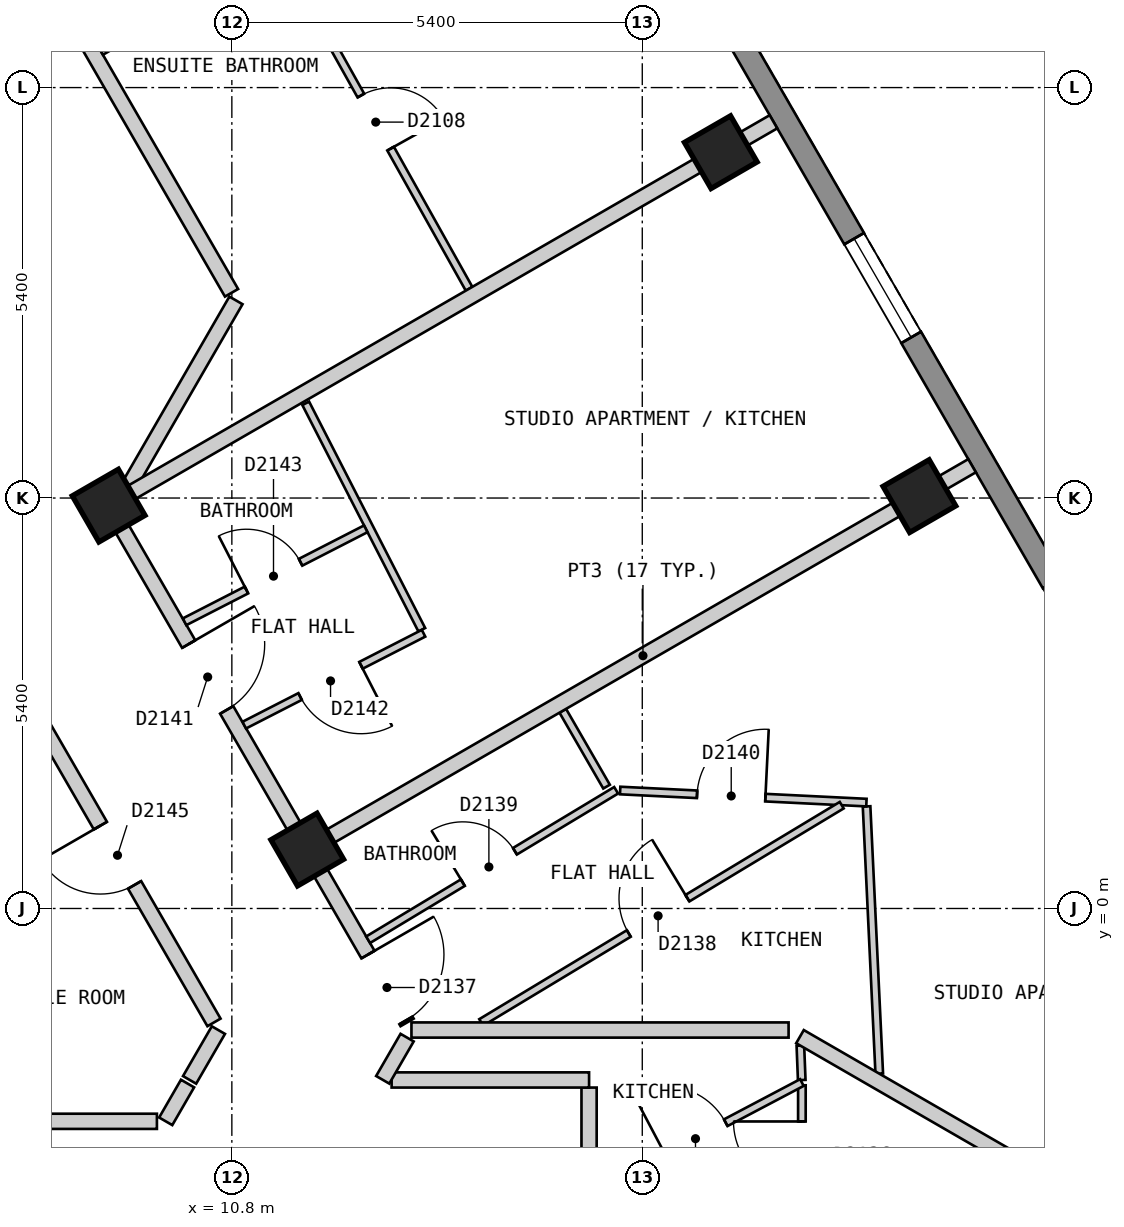
"""IFC4 building model, lengths in metres.
Left out: names, types, materials, properties, quantities, classifications, styles, units other than length and angle.
Written with IfcOpenShell. Run it as: python <this file> out.ifc"""

import sys

from ifc_helpers import new_model, si_unit, direction, frame, frame_2d, origin, origin_2d, place, context, subcontext, project, spatial, polyline, rectangle, outline, extrude, element, fill, save


model = new_model("IFC4")
c1 = context("Model", 3, precision=1e-05, world=origin(), true_north=direction((0.0, 1.0)))
c2 = subcontext(c1, "Body", "Model", "MODEL_VIEW")
j1 = project(units=[si_unit("LENGTHUNIT", "METRE"), si_unit("PLANEANGLEUNIT", "RADIAN")], contexts=[c1])
p1 = place(None, origin())
s1 = spatial("IfcSite", under=j1, at=p1, CompositionType="ELEMENT")
p2 = place(p1, origin())
s2 = spatial("IfcBuilding", under=s1, at=p2, CompositionType="ELEMENT")
p3 = place(p2, frame((0.0, 0.0, 211.8)))
s3 = spatial("IfcBuildingStorey", under=s2, at=p3, CompositionType="ELEMENT", Elevation=211.8)
for number, where, z_axis, x_axis in (
    (1, (19.846, 5.425, 0.0), (0.0, 0.0, 1.0), (-0.5, 0.866, 0.0)),
    (2, (17.233, 9.95, 0.0), (0.0, 0.0, 1.0), (-0.5, 0.866, 0.0)),
    (3, (11.792, 0.775, 0.0), (0.0, 0.0, 1.0), (-0.5, 0.866, 0.0)),
    (4, (9.179, 5.3, 0.0), (0.0, 0.0, 1.0), (-0.5, 0.866, 0.0)),
):
    element("IfcColumn", number, at=place(p3, frame(where, z_axis=z_axis, x_axis=x_axis)), inside=s3, PredefinedType="COLUMN", context=c2, shape_type="SweptSolid", body=[
        extrude(rectangle(XDim=0.7, YDim=0.7, at=origin_2d()), origin(), (0.0, 0.0, 1.0), 3.0),
    ])
p4 = place(p3, frame((23.599, 0.825, 0.0), z_axis=(0.0, 0.0, 1.0), x_axis=(-0.500003656944, 0.866023292436, 0.0)))
e5 = element("IfcWall", 5, at=p4, inside=s3, PredefinedType="SOLIDWALL", context=c2, shape_type="SweptSolid", body=[
    extrude(outline(polyline([(0.0, -0.15), (22.17, -0.15), (22.09, 0.15), (0.08, 0.15), (0.0, -0.15)])), origin(), (0.0, 0.0, 1.0), 2.7),
])
p5 = place(p4, frame((2.497, 0.0, 0.15)))
e6 = element("IfcOpeningElement", 6, at=p5, cuts=e5, PredefinedType="OPENING", context=c2, shape_type="SweptSolid", body=[
    extrude(rectangle(XDim=1.5, YDim=2.1, at=frame_2d((0.75, 1.05))), frame((0.0, 0.16, 0.0), z_axis=(0.0, -1.0, 0.0), x_axis=(1.0, 0.0, 0.0)), (0.0, 0.0, 1.0), 0.32),
])
p6 = place(p4, frame((7.723, 0.0, 0.15)))
e7 = element("IfcOpeningElement", 7, at=p6, cuts=e5, PredefinedType="OPENING", context=c2, shape_type="SweptSolid", body=[
    extrude(rectangle(XDim=1.5, YDim=2.1, at=frame_2d((0.75, 1.05))), frame((0.0, 0.16, 0.0), z_axis=(0.0, -1.0, 0.0), x_axis=(1.0, 0.0, 0.0)), (0.0, 0.0, 1.0), 0.32),
])
p7 = place(p4, frame((12.948, 0.0, 0.15)))
e8 = element("IfcOpeningElement", 8, at=p7, cuts=e5, PredefinedType="OPENING", context=c2, shape_type="SweptSolid", body=[
    extrude(rectangle(XDim=1.5, YDim=2.1, at=frame_2d((0.75, 1.05))), frame((0.0, 0.16, 0.0), z_axis=(0.0, -1.0, 0.0), x_axis=(1.0, 0.0, 0.0)), (0.0, 0.0, 1.0), 0.32),
])
p8 = place(p4, frame((18.173, 0.0, 0.15)))
e9 = element("IfcOpeningElement", 9, at=p8, cuts=e5, PredefinedType="OPENING", context=c2, shape_type="SweptSolid", body=[
    extrude(rectangle(XDim=1.5, YDim=2.1, at=frame_2d((0.75, 1.05))), frame((0.0, 0.16, 0.0), z_axis=(0.0, -1.0, 0.0), x_axis=(1.0, 0.0, 0.0)), (0.0, 0.0, 1.0), 0.32),
])
p9 = place(p3, frame((8.026, 2.899, 0.0), z_axis=(0.0, 0.0, 1.0), x_axis=(0.499986018985, -0.866033475577, 0.0)))
e10 = element("IfcWall", 10, at=p9, inside=s3, PredefinedType="PARTITIONING", context=c2, shape_type="SweptSolid", body=[
    extrude(rectangle(XDim=5.078, YDim=0.2, at=frame_2d((2.539, 0.0))), origin(), (0.0, 0.0, 1.0), 2.7),
])
p10 = place(p9, frame((2.089, 0.0, 0.0)))
e11 = element("IfcOpeningElement", 11, at=p10, cuts=e10, PredefinedType="OPENING", context=c2, shape_type="SweptSolid", body=[
    extrude(rectangle(XDim=0.9, YDim=2.1, at=frame_2d((0.45, 1.05))), frame((0.0, 0.11, 0.0), z_axis=(0.0, -1.0, 0.0), x_axis=(1.0, 0.0, 0.0)), (0.0, 0.0, 1.0), 0.22),
])
p11 = place(p3, frame((9.238, 5.2, 0.0), z_axis=(0.0, 0.0, 1.0), x_axis=(0.500025705601, -0.86601056214, 0.0)))
e12 = element("IfcWall", 12, at=p11, inside=s3, PredefinedType="PARTITIONING", context=c2, shape_type="SweptSolid", body=[
    extrude(rectangle(XDim=7.735, YDim=0.2, at=frame_2d((3.868, 0.0))), origin(), (0.0, 0.0, 1.0), 2.7),
])
p12 = place(p11, frame((6.705, 0.0, 0.0)))
e13 = element("IfcOpeningElement", 13, at=p12, cuts=e12, PredefinedType="OPENING", context=c2, shape_type="SweptSolid", body=[
    extrude(rectangle(XDim=1.0, YDim=2.1, at=frame_2d((0.5, 1.05))), frame((0.0, 0.11, 0.0), z_axis=(0.0, -1.0, 0.0), x_axis=(1.0, 0.0, 0.0)), (0.0, 0.0, 1.0), 0.22),
])
p13 = place(p11, frame((1.988, 0.0, 0.0)))
e14 = element("IfcOpeningElement", 14, at=p13, cuts=e12, PredefinedType="OPENING", context=c2, shape_type="SweptSolid", body=[
    extrude(rectangle(XDim=1.0, YDim=2.1, at=frame_2d((0.5, 1.05))), frame((0.0, 0.11, 0.0), z_axis=(0.0, -1.0, 0.0), x_axis=(1.0, 0.0, 0.0)), (0.0, 0.0, 1.0), 0.22),
])
p14 = place(p3, frame((5.485, 17.3, 0.0), z_axis=(0.0, 0.0, 1.0), x_axis=(0.499943285704, -0.866058145322, 0.0)))
e15 = element("IfcWall", 15, at=p14, inside=s3, PredefinedType="PARTITIONING", context=c2, shape_type="SweptSolid", body=[
    extrude(rectangle(XDim=10.623, YDim=0.2, at=frame_2d((5.312, 0.0))), origin(), (0.0, 0.0, 1.0), 2.7),
])
p15 = place(p3, frame((15.5, -2.356, 0.0), z_axis=(0.0, 0.0, 1.0), x_axis=(0.0, -1.0, 0.0)))
e16 = element("IfcWall", 16, at=p15, inside=s3, PredefinedType="PARTITIONING", context=c2, shape_type="SweptSolid", body=[
    extrude(rectangle(XDim=1.354, YDim=0.2, at=frame_2d((0.677, 0.0))), origin(), (0.0, 0.0, 1.0), 2.7),
])
p16 = place(p3, frame((12.902, -2.256, 0.0), z_axis=(0.0, 0.0, 1.0), x_axis=(1.0, 0.0, 0.0)))
e17 = element("IfcWall", 17, at=p16, inside=s3, PredefinedType="PARTITIONING", context=c2, shape_type="SweptSolid", body=[
    extrude(rectangle(XDim=2.598, YDim=0.2, at=frame_2d((1.299, 0.0))), origin(), (0.0, 0.0, 1.0), 2.7),
])
p17 = place(p3, frame((6.929, -2.8, 0.0), z_axis=(0.0, 0.0, 1.0), x_axis=(1.0, 0.0, 0.0)))
e18 = element("IfcWall", 18, at=p17, inside=s3, PredefinedType="PARTITIONING", context=c2, shape_type="SweptSolid", body=[
    extrude(rectangle(XDim=2.885, YDim=0.2, at=frame_2d((1.442, 0.0))), origin(), (0.0, 0.0, 1.0), 2.7),
])
p18 = place(p3, frame((9.454, 5.574, 0.0), z_axis=(0.0, 0.0, 1.0), x_axis=(0.499795394297, 0.86614350072, 0.0)))
e19 = element("IfcWall", 19, at=p18, inside=s3, PredefinedType="PARTITIONING", context=c2, shape_type="SweptSolid", body=[
    extrude(rectangle(XDim=2.801, YDim=0.2, at=frame_2d((1.4, 0.0))), origin(), (0.0, 0.0, 1.0), 2.7),
])
p19 = place(p3, frame((9.93, -2.8, 0.0), z_axis=(0.0, 0.0, 1.0), x_axis=(0.500164219654, 0.865930570761, 0.0)))
e20 = element("IfcWall", 20, at=p19, inside=s3, PredefinedType="PARTITIONING", context=c2, shape_type="SweptSolid", body=[
    extrude(rectangle(XDim=0.574, YDim=0.2, at=frame_2d((0.287, 0.0))), origin(), (0.0, 0.0, 1.0), 2.7),
])
p20 = place(p3, frame((10.244, -2.255, 0.0), z_axis=(0.0, 0.0, 1.0), x_axis=(0.50109986513, 0.865389464442, 0.0)))
e21 = element("IfcWall", 21, at=p20, inside=s3, PredefinedType="PARTITIONING", context=c2, shape_type="SweptSolid", body=[
    extrude(rectangle(XDim=0.757, YDim=0.2, at=frame_2d((0.378, 0.0))), origin(), (0.0, 0.0, 1.0), 2.7),
])
p21 = place(p3, frame((12.785, -2.254, 0.0), z_axis=(0.0, 0.0, 1.0), x_axis=(0.500766044352, 0.865582675903, 0.0)))
e22 = element("IfcWall", 22, at=p21, inside=s3, PredefinedType="PARTITIONING", context=c2, shape_type="SweptSolid", body=[
    extrude(rectangle(XDim=0.641, YDim=0.2, at=frame_2d((0.321, 0.0))), origin(), (0.0, 0.0, 1.0), 2.7),
])
p22 = place(p3, frame((15.154, 2.601, 0.0), z_axis=(0.0, 0.0, 1.0), x_axis=(0.499808046739, -0.866136199691, 0.0)))
e23 = element("IfcWall", 23, at=p22, inside=s3, PredefinedType="PARTITIONING", context=c2, shape_type="SweptSolid", body=[
    extrude(rectangle(XDim=1.152, YDim=0.1, at=frame_2d((0.576, 0.0))), origin(), (0.0, 0.0, 1.0), 2.7),
])
p23 = place(p3, frame((11.441, 12.582, 0.0), z_axis=(0.0, 0.0, 1.0), x_axis=(0.488568218554, -0.872525699231, 0.0)))
e24 = element("IfcWall", 24, at=p23, inside=s3, PredefinedType="PARTITIONING", context=c2, shape_type="SweptSolid", body=[
    extrude(rectangle(XDim=5.076, YDim=0.1, at=frame_2d((2.538, 0.0))), origin(), (0.0, 0.0, 1.0), 2.7),
])
p24 = place(p23, frame((2.163, 0.0, 0.0)))
e25 = element("IfcOpeningElement", 25, at=p24, cuts=e24, PredefinedType="OPENING", context=c2, shape_type="SweptSolid", body=[
    extrude(rectangle(XDim=0.8, YDim=2.1, at=frame_2d((0.4, 1.05))), frame((0.0, 0.06, 0.0), z_axis=(0.0, -1.0, 0.0), x_axis=(1.0, 0.0, 0.0)), (0.0, 0.0, 1.0), 0.12),
])
p25 = place(p3, frame((11.772, 6.646, 0.0), z_axis=(0.0, 0.0, 1.0), x_axis=(0.456175983405, -0.889889584254, 0.0)))
e26 = element("IfcWall", 26, at=p25, inside=s3, PredefinedType="PARTITIONING", context=c2, shape_type="SweptSolid", body=[
    extrude(rectangle(XDim=3.348, YDim=0.1, at=frame_2d((1.674, 0.0))), origin(), (0.0, 0.0, 1.0), 2.7),
])
p26 = place(p3, frame((18.28, -1.804, 0.0), z_axis=(0.0, 0.0, 1.0), x_axis=(0.039839036731, -0.999206110446, 0.0)))
e27 = element("IfcWall", 27, at=p26, inside=s3, PredefinedType="PARTITIONING", context=c2, shape_type="SweptSolid", body=[
    extrude(rectangle(XDim=0.453, YDim=0.1, at=frame_2d((0.227, 0.0))), origin(), (0.0, 0.0, 1.0), 2.7),
])
p27 = place(p3, frame((19.151, 1.343, 0.0), z_axis=(0.0, 0.0, 1.0), x_axis=(0.047509130714, -0.998870803707, 0.0)))
e28 = element("IfcWall", 28, at=p27, inside=s3, PredefinedType="PARTITIONING", context=c2, shape_type="SweptSolid", body=[
    extrude(rectangle(XDim=3.52, YDim=0.1, at=frame_2d((1.76, 0.0))), origin(), (0.0, 0.0, 1.0), 2.7),
])
p28 = place(p3, frame((15.909, 1.552, 0.0), z_axis=(0.0, 0.0, 1.0), x_axis=(0.998799003463, -0.048995414909, 0.0)))
e29 = element("IfcWall", 29, at=p28, inside=s3, PredefinedType="PARTITIONING", context=c2, shape_type="SweptSolid", body=[
    extrude(rectangle(XDim=3.244, YDim=0.1, at=frame_2d((1.622, 0.0))), origin(), (0.0, 0.0, 1.0), 2.7),
])
p29 = place(p28, frame((1.013, 0.0, 0.0)))
e30 = element("IfcOpeningElement", 30, at=p29, cuts=e29, PredefinedType="OPENING", context=c2, shape_type="SweptSolid", body=[
    extrude(rectangle(XDim=0.9, YDim=2.1, at=frame_2d((0.45, 1.05))), frame((0.0, 0.06, 0.0), z_axis=(0.0, -1.0, 0.0), x_axis=(1.0, 0.0, 0.0)), (0.0, 0.0, 1.0), 0.12),
])
p30 = place(p3, frame((18.3, -7.496, 0.0), z_axis=(0.0, 0.0, 1.0), x_axis=(0.0, 1.0, 0.0)))
e31 = element("IfcWall", 31, at=p30, inside=s3, PredefinedType="PARTITIONING", context=c2, shape_type="SweptSolid", body=[
    extrude(rectangle(XDim=5.17, YDim=0.1, at=frame_2d((2.585, 0.0))), origin(), (0.0, 0.0, 1.0), 2.7),
])
p31 = place(p30, frame((3.794, 0.0, 0.0)))
e32 = element("IfcOpeningElement", 32, at=p31, cuts=e31, PredefinedType="OPENING", context=c2, shape_type="SweptSolid", body=[
    extrude(rectangle(XDim=0.9, YDim=2.1, at=frame_2d((0.45, 1.05))), frame((0.0, 0.06, 0.0), z_axis=(0.0, -1.0, 0.0), x_axis=(1.0, 0.0, 0.0)), (0.0, 0.0, 1.0), 0.12),
])
p32 = place(p3, frame((10.178, 3.772, 0.0), z_axis=(0.0, 0.0, 1.0), x_axis=(0.889732071959, 0.456483121405, 0.0)))
e33 = element("IfcWall", 33, at=p32, inside=s3, PredefinedType="PARTITIONING", context=c2, shape_type="SweptSolid", body=[
    extrude(rectangle(XDim=2.679, YDim=0.1, at=frame_2d((1.34, 0.0))), origin(), (0.0, 0.0, 1.0), 2.7),
])
p33 = place(p32, frame((0.915, 0.0, 0.0)))
e34 = element("IfcOpeningElement", 34, at=p33, cuts=e33, PredefinedType="OPENING", context=c2, shape_type="SweptSolid", body=[
    extrude(rectangle(XDim=0.8, YDim=2.1, at=frame_2d((0.4, 1.05))), frame((0.0, 0.06, 0.0), z_axis=(0.0, -1.0, 0.0), x_axis=(1.0, 0.0, 0.0)), (0.0, 0.0, 1.0), 0.12),
])
p34 = place(p3, frame((10.963, 2.412, 0.0), z_axis=(0.0, 0.0, 1.0), x_axis=(0.889943997558, 0.456069820543, 0.0)))
e35 = element("IfcWall", 35, at=p34, inside=s3, PredefinedType="PARTITIONING", context=c2, shape_type="SweptSolid", body=[
    extrude(rectangle(XDim=2.651, YDim=0.1, at=frame_2d((1.325, 0.0))), origin(), (0.0, 0.0, 1.0), 2.7),
])
p35 = place(p34, frame((0.826, 0.0, 0.0)))
e36 = element("IfcOpeningElement", 36, at=p35, cuts=e35, PredefinedType="OPENING", context=c2, shape_type="SweptSolid", body=[
    extrude(rectangle(XDim=0.9, YDim=2.1, at=frame_2d((0.45, 1.05))), frame((0.0, 0.06, 0.0), z_axis=(0.0, -1.0, 0.0), x_axis=(1.0, 0.0, 0.0)), (0.0, 0.0, 1.0), 0.12),
])
p36 = place(p3, frame((15.5, -3.767, 0.0), z_axis=(0.0, 0.0, 1.0), x_axis=(0.884482889541, 0.466572628976, 0.0)))
e37 = element("IfcWall", 37, at=p36, inside=s3, PredefinedType="PARTITIONING", context=c2, shape_type="SweptSolid", body=[
    extrude(rectangle(XDim=3.166, YDim=0.1, at=frame_2d((1.583, 0.0))), origin(), (0.0, 0.0, 1.0), 2.7),
])
p37 = place(p36, frame((1.133, 0.0, 0.0)))
e38 = element("IfcOpeningElement", 38, at=p37, cuts=e37, PredefinedType="OPENING", context=c2, shape_type="SweptSolid", body=[
    extrude(rectangle(XDim=0.9, YDim=2.1, at=frame_2d((0.45, 1.05))), frame((0.0, 0.06, 0.0), z_axis=(0.0, -1.0, 0.0), x_axis=(1.0, 0.0, 0.0)), (0.0, 0.0, 1.0), 0.12),
])
p38 = place(p3, frame((9.079, 11.275, 0.0), z_axis=(0.0, 0.0, 1.0), x_axis=(0.866001485781, 0.500041424909, 0.0)))
e39 = element("IfcWall", 39, at=p38, inside=s3, PredefinedType="PARTITIONING", context=c2, shape_type="SweptSolid", body=[
    extrude(rectangle(XDim=7.2, YDim=0.1, at=frame_2d((3.6, 0.0))), origin(), (0.0, 0.0, 1.0), 2.7),
])
p39 = place(p38, frame((4.5, 0.0, 0.0)))
e40 = element("IfcOpeningElement", 40, at=p39, cuts=e39, PredefinedType="OPENING", context=c2, shape_type="SweptSolid", body=[
    extrude(rectangle(XDim=0.9, YDim=2.1, at=frame_2d((0.45, 1.05))), frame((0.0, 0.06, 0.0), z_axis=(0.0, -1.0, 0.0), x_axis=(1.0, 0.0, 0.0)), (0.0, 0.0, 1.0), 0.12),
])
p40 = place(p3, frame((12.593, -0.411, 0.0), z_axis=(0.0, 0.0, 1.0), x_axis=(0.856558445359, 0.516050026339, 0.0)))
e41 = element("IfcWall", 41, at=p40, inside=s3, PredefinedType="PARTITIONING", context=c2, shape_type="SweptSolid", body=[
    extrude(rectangle(XDim=3.809, YDim=0.1, at=frame_2d((1.905, 0.0))), origin(), (0.0, 0.0, 1.0), 2.7),
])
p41 = place(p40, frame((1.455, 0.0, 0.0)))
e42 = element("IfcOpeningElement", 42, at=p41, cuts=e41, PredefinedType="OPENING", context=c2, shape_type="SweptSolid", body=[
    extrude(rectangle(XDim=0.8, YDim=2.1, at=frame_2d((0.4, 1.05))), frame((0.0, 0.06, 0.0), z_axis=(0.0, -1.0, 0.0), x_axis=(1.0, 0.0, 0.0)), (0.0, 0.0, 1.0), 0.12),
])
p42 = place(p3, frame((14.081, -1.499, 0.0), z_axis=(0.0, 0.0, 1.0), x_axis=(0.85652273816, 0.516109289798, 0.0)))
e43 = element("IfcWall", 43, at=p42, inside=s3, PredefinedType="PARTITIONING", context=c2, shape_type="SweptSolid", body=[
    extrude(rectangle(XDim=5.537, YDim=0.1, at=frame_2d((2.769, 0.0))), origin(), (0.0, 0.0, 1.0), 2.7),
])
p43 = place(p42, frame((2.267, 0.0, 0.0)))
e44 = element("IfcOpeningElement", 44, at=p43, cuts=e43, PredefinedType="OPENING", context=c2, shape_type="SweptSolid", body=[
    extrude(rectangle(XDim=0.9, YDim=2.1, at=frame_2d((0.45, 1.05))), frame((0.0, 0.06, 0.0), z_axis=(0.0, -1.0, 0.0), x_axis=(1.0, 0.0, 0.0)), (0.0, 0.0, 1.0), 0.12),
])
p44 = place(p3, frame((18.275, -1.686, 0.0), z_axis=(0.0, 0.0, 1.0), x_axis=(0.866041167766, -0.49997269499, 0.0)))
e45 = element("IfcWall", 45, at=p44, inside=s3, PredefinedType="PARTITIONING", context=c2, shape_type="SweptSolid", body=[
    extrude(rectangle(XDim=5.63, YDim=0.2, at=frame_2d((2.815, 0.0))), origin(), (0.0, 0.0, 1.0), 2.7),
])
p45 = place(p3, frame((13.163, -1.599, 0.0), z_axis=(0.0, 0.0, 1.0), x_axis=(1.0, 0.0, 0.0)))
e46 = element("IfcWall", 46, at=p45, inside=s3, PredefinedType="PARTITIONING", context=c2, shape_type="SweptSolid", body=[
    extrude(rectangle(XDim=4.962, YDim=0.2, at=frame_2d((2.481, 0.0))), origin(), (0.0, 0.0, 1.0), 2.7),
])
p46 = place(p3, frame((11.879, 0.826, 0.0), z_axis=(0.0, 0.0, 1.0), x_axis=(0.866065245018, 0.499930986609, 0.0)))
e47 = element("IfcWall", 47, at=p46, inside=s3, PredefinedType="PARTITIONING", context=c2, shape_type="SweptSolid", body=[
    extrude(rectangle(XDim=10.0, YDim=0.2, at=frame_2d((5.0, 0.0))), origin(), (0.0, 0.0, 1.0), 2.7),
])
p47 = place(p3, frame((9.354, 5.401, 0.0), z_axis=(0.0, 0.0, 1.0), x_axis=(0.866018411306, 0.500012111133, 0.0)))
e48 = element("IfcWall", 48, at=p47, inside=s3, PredefinedType="PARTITIONING", context=c2, shape_type="SweptSolid", body=[
    extrude(rectangle(XDim=9.898, YDim=0.2, at=frame_2d((4.949, 0.0))), origin(), (0.0, 0.0, 1.0), 2.7),
])
p48 = place(p6, origin())
e49 = element("IfcWindow", 49, at=p48, inside=s3, PartitioningType="SINGLE_PANEL", PredefinedType="WINDOW", context=c2, shape_type="SweptSolid", body=[
    extrude(rectangle(XDim=1.5, YDim=2.1, at=frame_2d((0.75, 1.05))), frame((0.0, 0.03, 0.0), z_axis=(0.0, -1.0, 0.0), x_axis=(1.0, 0.0, 0.0)), (0.0, 0.0, 1.0), 0.06),
])
fill(e7, e49)
p49 = place(p24, origin())
e50 = element("IfcDoor", 50, at=p49, inside=s3, OperationType="SINGLE_SWING_RIGHT", PredefinedType="DOOR", context=c2, shape_type="SweptSolid", body=[
    extrude(rectangle(XDim=0.8, YDim=2.1, at=frame_2d((0.4, 1.05))), frame((0.0, 0.025, 0.0), z_axis=(0.0, -1.0, 0.0), x_axis=(1.0, 0.0, 0.0)), (0.0, 0.0, 1.0), 0.05),
])
fill(e25, e50)
p50 = place(p37, origin())
e51 = element("IfcDoor", 51, at=p50, inside=s3, OperationType="SINGLE_SWING_LEFT", PredefinedType="DOOR", context=c2, shape_type="SweptSolid", body=[
    extrude(rectangle(XDim=0.9, YDim=2.1, at=frame_2d((0.45, 1.05))), frame((0.0, 0.025, 0.0), z_axis=(0.0, -1.0, 0.0), x_axis=(1.0, 0.0, 0.0)), (0.0, 0.0, 1.0), 0.05),
])
fill(e38, e51)
p51 = place(p31, origin())
e52 = element("IfcDoor", 52, at=p51, inside=s3, OperationType="SINGLE_SWING_RIGHT", PredefinedType="DOOR", context=c2, shape_type="SweptSolid", body=[
    extrude(rectangle(XDim=0.9, YDim=2.1, at=frame_2d((0.45, 1.05))), frame((0.0, 0.025, 0.0), z_axis=(0.0, -1.0, 0.0), x_axis=(1.0, 0.0, 0.0)), (0.0, 0.0, 1.0), 0.05),
])
fill(e32, e52)
p52 = place(p12, origin())
e53 = element("IfcDoor", 53, at=p52, inside=s3, OperationType="SINGLE_SWING_LEFT", PredefinedType="DOOR", context=c2, shape_type="SweptSolid", body=[
    extrude(rectangle(XDim=1.0, YDim=2.1, at=frame_2d((0.5, 1.05))), frame((0.0, 0.025, 0.0), z_axis=(0.0, -1.0, 0.0), x_axis=(1.0, 0.0, 0.0)), (0.0, 0.0, 1.0), 0.05),
])
fill(e13, e53)
p53 = place(p43, origin())
e54 = element("IfcDoor", 54, at=p53, inside=s3, OperationType="SINGLE_SWING_RIGHT", PredefinedType="DOOR", context=c2, shape_type="SweptSolid", body=[
    extrude(rectangle(XDim=0.9, YDim=2.1, at=frame_2d((0.45, 1.05))), frame((0.0, 0.025, 0.0), z_axis=(0.0, -1.0, 0.0), x_axis=(1.0, 0.0, 0.0)), (0.0, 0.0, 1.0), 0.05),
])
fill(e44, e54)
p54 = place(p41, origin())
e55 = element("IfcDoor", 55, at=p54, inside=s3, OperationType="SINGLE_SWING_LEFT", PredefinedType="DOOR", context=c2, shape_type="SweptSolid", body=[
    extrude(rectangle(XDim=0.8, YDim=2.1, at=frame_2d((0.4, 1.05))), frame((0.0, 0.025, 0.0), z_axis=(0.0, -1.0, 0.0), x_axis=(1.0, 0.0, 0.0)), (0.0, 0.0, 1.0), 0.05),
])
fill(e42, e55)
p55 = place(p29, origin())
e56 = element("IfcDoor", 56, at=p55, inside=s3, OperationType="SINGLE_SWING_RIGHT", PredefinedType="DOOR", context=c2, shape_type="SweptSolid", body=[
    extrude(rectangle(XDim=0.9, YDim=2.1, at=frame_2d((0.45, 1.05))), frame((0.0, 0.025, 0.0), z_axis=(0.0, -1.0, 0.0), x_axis=(1.0, 0.0, 0.0)), (0.0, 0.0, 1.0), 0.05),
])
fill(e30, e56)
p56 = place(p13, origin())
e57 = element("IfcDoor", 57, at=p56, inside=s3, OperationType="SINGLE_SWING_LEFT", PredefinedType="DOOR", context=c2, shape_type="SweptSolid", body=[
    extrude(rectangle(XDim=1.0, YDim=2.1, at=frame_2d((0.5, 1.05))), frame((0.0, 0.025, 0.0), z_axis=(0.0, -1.0, 0.0), x_axis=(1.0, 0.0, 0.0)), (0.0, 0.0, 1.0), 0.05),
])
fill(e14, e57)
p57 = place(p35, origin())
e58 = element("IfcDoor", 58, at=p57, inside=s3, OperationType="SINGLE_SWING_RIGHT", PredefinedType="DOOR", context=c2, shape_type="SweptSolid", body=[
    extrude(rectangle(XDim=0.9, YDim=2.1, at=frame_2d((0.45, 1.05))), frame((0.0, 0.025, 0.0), z_axis=(0.0, -1.0, 0.0), x_axis=(1.0, 0.0, 0.0)), (0.0, 0.0, 1.0), 0.05),
])
fill(e36, e58)
p58 = place(p33, origin())
e59 = element("IfcDoor", 59, at=p58, inside=s3, OperationType="SINGLE_SWING_LEFT", PredefinedType="DOOR", context=c2, shape_type="SweptSolid", body=[
    extrude(rectangle(XDim=0.8, YDim=2.1, at=frame_2d((0.4, 1.05))), frame((0.0, 0.025, 0.0), z_axis=(0.0, -1.0, 0.0), x_axis=(1.0, 0.0, 0.0)), (0.0, 0.0, 1.0), 0.05),
])
fill(e34, e59)
p59 = place(p10, origin())
e60 = element("IfcDoor", 60, at=p59, inside=s3, OperationType="SINGLE_SWING_LEFT", PredefinedType="DOOR", context=c2, shape_type="SweptSolid", body=[
    extrude(rectangle(XDim=0.9, YDim=2.1, at=frame_2d((0.45, 1.05))), frame((0.0, 0.025, 0.0), z_axis=(0.0, -1.0, 0.0), x_axis=(1.0, 0.0, 0.0)), (0.0, 0.0, 1.0), 0.05),
])
fill(e11, e60)
save(model, sys.argv[1])
